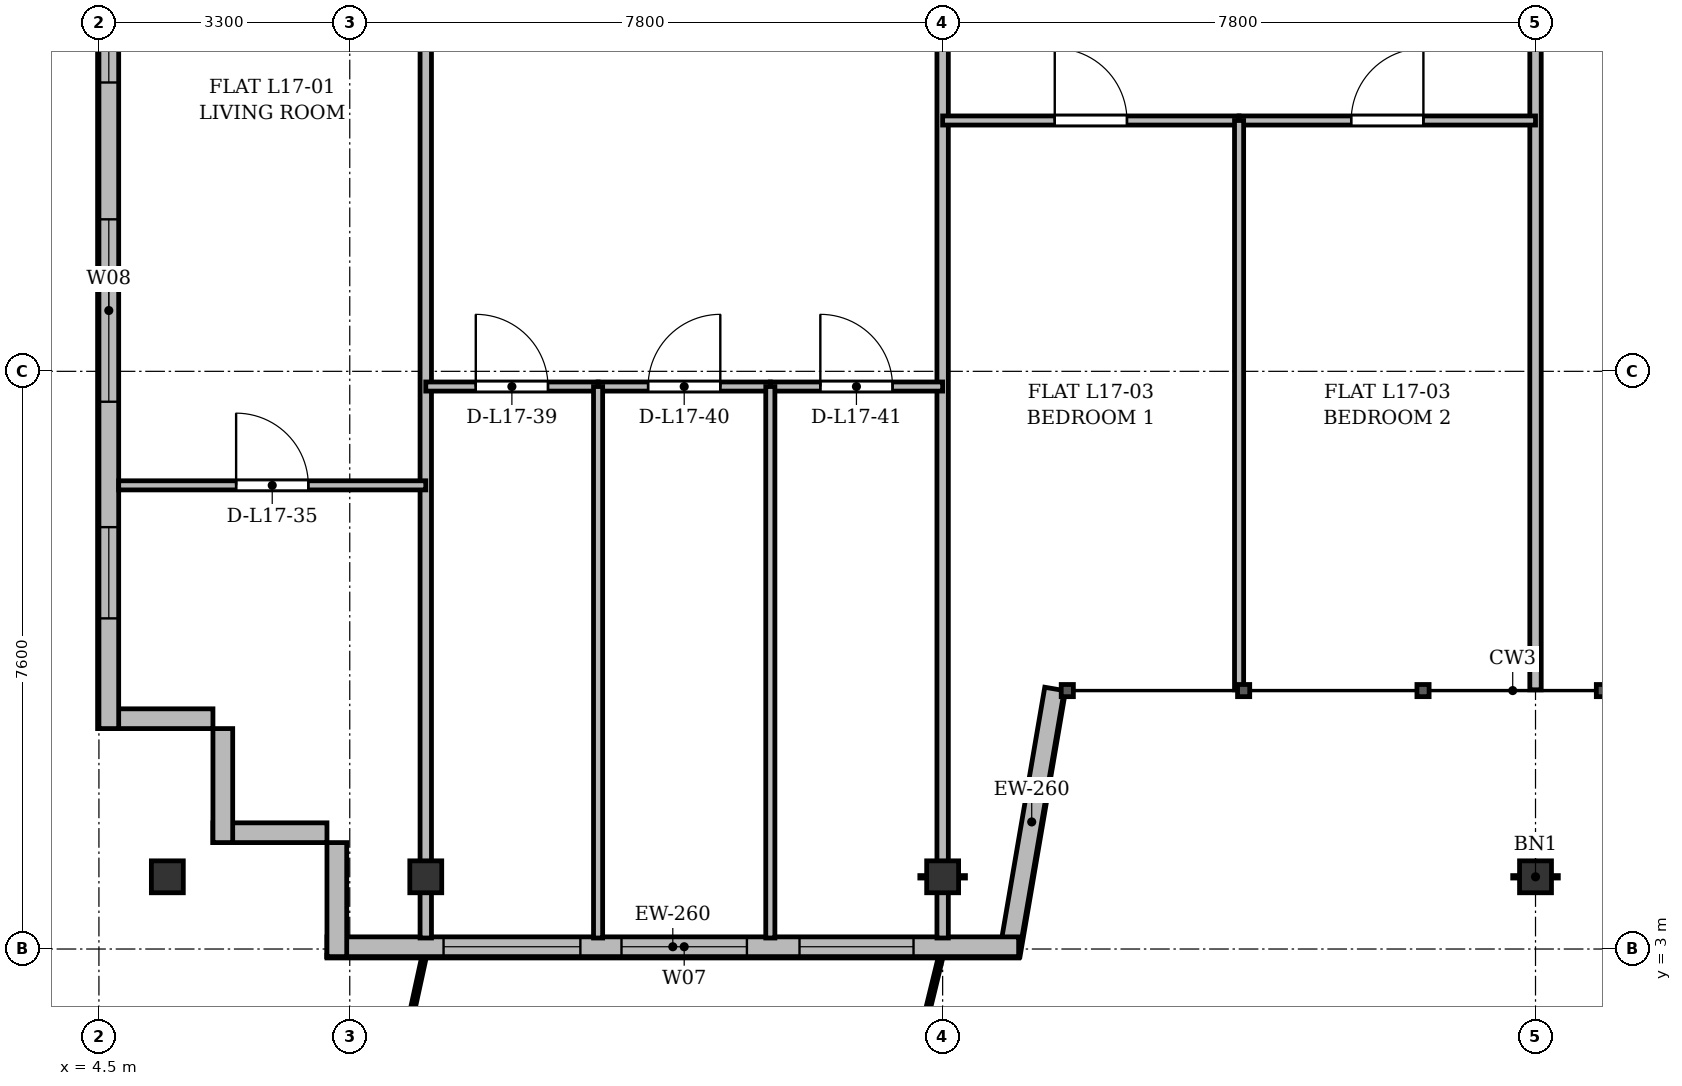
"""IFC4 building model, lengths in metres.
Left out: names, types, materials, properties, quantities, classifications, styles, units other than length and angle.
Written with IfcOpenShell. Run it as: python <this file> out.ifc"""

import sys

from ifc_helpers import new_model, si_unit, direction, frame, frame_2d, origin, origin_2d, place, context, subcontext, project, spatial, rectangle, i_section, extrude, source, transform, mapped, element, fill, save


model = new_model("IFC4")
c1 = context("Model", 3, precision=1e-05, world=origin(), true_north=direction((0.0, 1.0)))
c2 = subcontext(c1, "Body", "Model", "MODEL_VIEW")
j1 = project(units=[si_unit("LENGTHUNIT", "METRE"), si_unit("PLANEANGLEUNIT", "RADIAN")], contexts=[c1])
p1 = place(None, origin())
s1 = spatial("IfcSite", under=j1, at=p1, CompositionType="ELEMENT")
p2 = place(p1, origin())
s2 = spatial("IfcBuilding", under=s1, at=p2, CompositionType="ELEMENT")
p3 = place(p2, frame((0.0, 0.0, 66.7)))
s3 = spatial("IfcBuildingStorey", under=s2, at=p3, CompositionType="ELEMENT", Elevation=66.7)
m1 = source(origin(), c2, "Body", "SweptSolid", [
    extrude(i_section(OverallWidth=0.42, OverallDepth=0.42, WebThickness=0.026, FlangeThickness=0.04, at=origin_2d()), origin(), (0.0, 0.0, 1.0), 3.6),
])
for number, where, z_axis, x_axis in (
    (1, (5.4, 3.95, 0.0), (0.0, 0.0, 1.0), (1.0, 0.0, 0.0)),
    (2, (8.8, 3.95, 0.0), (0.0, 0.0, 1.0), (1.0, 0.0, 0.0)),
    (3, (15.6, 3.95, 0.0), (0.0, 0.0, 1.0), (1.0, 0.0, 0.0)),
    (4, (23.4, 3.95, 0.0), (0.0, 0.0, 1.0), (1.0, 0.0, 0.0)),
):
    element("IfcColumn", number, at=place(p3, frame(where, z_axis=z_axis, x_axis=x_axis)), inside=s3, PredefinedType="COLUMN", context=c2, shape_type="MappedRepresentation", body=[
        mapped(m1, transform((0.0, 0.0, 0.0), x_axis=(1.0, 0.0, 0.0), y_axis=(0.0, 1.0, 0.0), z_axis=(0.0, 0.0, 1.0), scale=1.0)),
    ])
for number, where, z_axis, x_axis in (
    (5, (7.5, 4.53, 0.0), (0.0, 0.0, 1.0), (-1.0, 0.0, 0.0)),
    (6, (6.13, 4.4, 0.0), (0.0, 0.0, 1.0), (0.0, 1.0, 0.0)),
):
    element("IfcWall", number, at=place(p3, frame(where, z_axis=z_axis, x_axis=x_axis)), inside=s3, PredefinedType="SOLIDWALL", context=c2, shape_type="SweptSolid", body=[
        extrude(rectangle(XDim=1.5, YDim=0.26, at=frame_2d((0.75, 0.0))), origin(), (0.0, 0.0, 1.0), 3.34),
    ])
p4 = place(p3, frame((6.0, 6.03, 0.0), z_axis=(0.0, 0.0, 1.0), x_axis=(-1.0, 0.0, 0.0)))
e7 = element("IfcWall", 7, at=p4, inside=s3, PredefinedType="SOLIDWALL", context=c2, shape_type="SweptSolid", body=[
    extrude(rectangle(XDim=1.5, YDim=0.26, at=frame_2d((0.75, 0.0))), origin(), (0.0, 0.0, 1.0), 2.752),
])
p5 = place(p3, frame((4.63, 5.9, 0.0), z_axis=(0.0, 0.0, 1.0), x_axis=(0.0, 1.0, 0.0)))
e8 = element("IfcWall", 8, at=p5, inside=s3, PredefinedType="SOLIDWALL", context=c2, shape_type="SweptSolid", body=[
    extrude(rectangle(XDim=39.6, YDim=0.26, at=frame_2d((19.8, 0.0))), origin(), (0.0, 0.0, 1.0), 3.34),
])
p6 = place(p5, frame((1.45, 0.0, 0.92)))
e9 = element("IfcOpeningElement", 9, at=p6, cuts=e8, PredefinedType="OPENING", context=c2, shape_type="SweptSolid", body=[
    extrude(rectangle(XDim=1.2, YDim=1.65, at=frame_2d((0.6, 0.825))), frame((0.0, 0.14, 0.0), z_axis=(0.0, -1.0, 0.0), x_axis=(1.0, 0.0, 0.0)), (0.0, 0.0, 1.0), 0.28),
])
p7 = place(p5, frame((4.3, 0.0, 0.92)))
e10 = element("IfcOpeningElement", 10, at=p7, cuts=e8, PredefinedType="OPENING", context=c2, shape_type="SweptSolid", body=[
    extrude(rectangle(XDim=2.4, YDim=2.1, at=frame_2d((1.2, 1.05))), frame((0.0, 0.14, 0.0), z_axis=(0.0, -1.0, 0.0), x_axis=(1.0, 0.0, 0.0)), (0.0, 0.0, 1.0), 0.28),
])
p8 = place(p5, frame((8.5, 0.0, 0.92)))
e11 = element("IfcOpeningElement", 11, at=p8, cuts=e8, PredefinedType="OPENING", context=c2, shape_type="SweptSolid", body=[
    extrude(rectangle(XDim=2.4, YDim=2.1, at=frame_2d((1.2, 1.05))), frame((0.0, 0.14, 0.0), z_axis=(0.0, -1.0, 0.0), x_axis=(1.0, 0.0, 0.0)), (0.0, 0.0, 1.0), 0.28),
])
p9 = place(p5, frame((33.9, 0.0, 0.92)))
e12 = element("IfcOpeningElement", 12, at=p9, cuts=e8, PredefinedType="OPENING", context=c2, shape_type="SweptSolid", body=[
    extrude(rectangle(XDim=1.2, YDim=1.65, at=frame_2d((0.6, 0.825))), frame((0.0, 0.14, 0.0), z_axis=(0.0, -1.0, 0.0), x_axis=(1.0, 0.0, 0.0)), (0.0, 0.0, 1.0), 0.28),
])
p10 = place(p5, frame((37.25, 0.0, 0.92)))
e13 = element("IfcOpeningElement", 13, at=p10, cuts=e8, PredefinedType="OPENING", context=c2, shape_type="SweptSolid", body=[
    extrude(rectangle(XDim=1.2, YDim=1.65, at=frame_2d((0.6, 0.825))), frame((0.0, 0.14, 0.0), z_axis=(0.0, -1.0, 0.0), x_axis=(1.0, 0.0, 0.0)), (0.0, 0.0, 1.0), 0.28),
])
p11 = place(p3, frame((17.072, 6.422, 0.0), z_axis=(0.0, 0.0, 1.0), x_axis=(-0.168990530437, -0.98561767467, 0.0)))
e14 = element("IfcWall", 14, at=p11, inside=s3, PredefinedType="SOLIDWALL", context=c2, shape_type="SweptSolid", body=[
    extrude(rectangle(XDim=3.551, YDim=0.26, at=frame_2d((1.775, 0.0))), origin(), (0.0, 0.0, 1.0), 2.69),
])
p12 = place(p3, frame((16.6, 3.03, 0.0), z_axis=(0.0, 0.0, 1.0), x_axis=(-1.0, 0.0, 0.0)))
e15 = element("IfcWall", 15, at=p12, inside=s3, PredefinedType="SOLIDWALL", context=c2, shape_type="SweptSolid", body=[
    extrude(rectangle(XDim=9.1, YDim=0.26, at=frame_2d((4.55, 0.0))), origin(), (0.0, 0.0, 1.0), 3.34),
])
p13 = place(p12, frame((1.383, 0.0, 0.9)))
e16 = element("IfcOpeningElement", 16, at=p13, cuts=e15, PredefinedType="OPENING", context=c2, shape_type="SweptSolid", body=[
    extrude(rectangle(XDim=1.5, YDim=1.75, at=frame_2d((0.75, 0.875))), frame((0.0, 0.14, 0.0), z_axis=(0.0, -1.0, 0.0), x_axis=(1.0, 0.0, 0.0)), (0.0, 0.0, 1.0), 0.28),
])
p14 = place(p12, frame((3.575, 0.0, 0.9)))
e17 = element("IfcOpeningElement", 17, at=p14, cuts=e15, PredefinedType="OPENING", context=c2, shape_type="SweptSolid", body=[
    extrude(rectangle(XDim=1.65, YDim=1.85, at=frame_2d((0.825, 0.925))), frame((0.0, 0.14, 0.0), z_axis=(0.0, -1.0, 0.0), x_axis=(1.0, 0.0, 0.0)), (0.0, 0.0, 1.0), 0.28),
])
p15 = place(p12, frame((5.766, 0.0, 0.9)))
e18 = element("IfcOpeningElement", 18, at=p15, cuts=e15, PredefinedType="OPENING", context=c2, shape_type="SweptSolid", body=[
    extrude(rectangle(XDim=1.8, YDim=1.8, at=frame_2d((0.9, 0.9))), frame((0.0, 0.14, 0.0), z_axis=(0.0, -1.0, 0.0), x_axis=(1.0, 0.0, 0.0)), (0.0, 0.0, 1.0), 0.28),
])
p16 = place(p3, frame((7.63, 2.9, 0.0), z_axis=(0.0, 0.0, 1.0), x_axis=(0.0, 1.0, 0.0)))
e19 = element("IfcWall", 19, at=p16, inside=s3, PredefinedType="SOLIDWALL", context=c2, shape_type="SweptSolid", body=[
    extrude(rectangle(XDim=1.5, YDim=0.26, at=frame_2d((0.75, 0.0))), origin(), (0.0, 0.0, 1.0), 2.69),
])
for number, where, z_axis, x_axis in (
    (20, (8.8, 3.145, 0.0), (0.0, 0.0, 1.0), (0.0, 1.0, 0.0)),
    (21, (15.6, 3.145, 0.0), (0.0, 0.0, 1.0), (0.0, 1.0, 0.0)),
):
    element("IfcWall", number, at=place(p3, frame(where, z_axis=z_axis, x_axis=x_axis)), inside=s3, PredefinedType="PARTITIONING", context=c2, shape_type="SweptSolid", body=[
        extrude(rectangle(XDim=24.455, YDim=0.15, at=frame_2d((12.228, 0.0))), origin(), (0.0, 0.0, 1.0), 2.752),
    ])
p17 = place(p3, frame((23.4, 6.41, 0.0), z_axis=(0.0, 0.0, 1.0), x_axis=(0.0, 1.0, 0.0)))
e22 = element("IfcWall", 22, at=p17, inside=s3, PredefinedType="PARTITIONING", context=c2, shape_type="SweptSolid", body=[
    extrude(rectangle(XDim=21.19, YDim=0.15, at=frame_2d((10.595, 0.0))), origin(), (0.0, 0.0, 1.0), 2.752),
])
p18 = place(p3, frame((4.76, 9.1, 0.0), z_axis=(0.0, 0.0, 1.0), x_axis=(1.0, 0.0, 0.0)))
e23 = element("IfcWall", 23, at=p18, inside=s3, PredefinedType="PARTITIONING", context=c2, shape_type="SweptSolid", body=[
    extrude(rectangle(XDim=4.04, YDim=0.12, at=frame_2d((2.02, 0.0))), origin(), (0.0, 0.0, 1.0), 2.752),
])
p19 = place(p18, frame((1.545, 0.0, 0.0)))
e24 = element("IfcOpeningElement", 24, at=p19, cuts=e23, PredefinedType="OPENING", context=c2, shape_type="SweptSolid", body=[
    extrude(rectangle(XDim=0.95, YDim=2.15, at=frame_2d((0.475, 1.075))), frame((0.0, 0.07, 0.0), z_axis=(0.0, -1.0, 0.0), x_axis=(1.0, 0.0, 0.0)), (0.0, 0.0, 1.0), 0.14),
])
p20 = place(p3, frame((8.8, 10.4, 0.0), z_axis=(0.0, 0.0, 1.0), x_axis=(1.0, 0.0, 0.0)))
e25 = element("IfcWall", 25, at=p20, inside=s3, PredefinedType="PARTITIONING", context=c2, shape_type="SweptSolid", body=[
    extrude(rectangle(XDim=2.267, YDim=0.12, at=frame_2d((1.133, 0.0))), origin(), (0.0, 0.0, 1.0), 2.752),
])
p21 = place(p20, frame((0.658, 0.0, 0.0)))
e26 = element("IfcOpeningElement", 26, at=p21, cuts=e25, PredefinedType="OPENING", context=c2, shape_type="SweptSolid", body=[
    extrude(rectangle(XDim=0.95, YDim=2.15, at=frame_2d((0.475, 1.075))), frame((0.0, 0.07, 0.0), z_axis=(0.0, -1.0, 0.0), x_axis=(1.0, 0.0, 0.0)), (0.0, 0.0, 1.0), 0.14),
])
p22 = place(p3, frame((11.067, 10.4, 0.0), z_axis=(0.0, 0.0, 1.0), x_axis=(1.0, 0.0, 0.0)))
e27 = element("IfcWall", 27, at=p22, inside=s3, PredefinedType="PARTITIONING", context=c2, shape_type="SweptSolid", body=[
    extrude(rectangle(XDim=2.266, YDim=0.12, at=frame_2d((1.133, 0.0))), origin(), (0.0, 0.0, 1.0), 3.34),
])
p23 = place(p22, frame((0.658, 0.0, 0.0)))
e28 = element("IfcOpeningElement", 28, at=p23, cuts=e27, PredefinedType="OPENING", context=c2, shape_type="SweptSolid", body=[
    extrude(rectangle(XDim=0.95, YDim=2.15, at=frame_2d((0.475, 1.075))), frame((0.0, 0.07, 0.0), z_axis=(0.0, -1.0, 0.0), x_axis=(1.0, 0.0, 0.0)), (0.0, 0.0, 1.0), 0.14),
])
p24 = place(p3, frame((11.067, 3.145, 0.0), z_axis=(0.0, 0.0, 1.0), x_axis=(0.0, 1.0, 0.0)))
e29 = element("IfcWall", 29, at=p24, inside=s3, PredefinedType="PARTITIONING", context=c2, shape_type="SweptSolid", body=[
    extrude(rectangle(XDim=7.255, YDim=0.12, at=frame_2d((3.627, 0.0))), origin(), (0.0, 0.0, 1.0), 2.69),
])
p25 = place(p3, frame((13.333, 10.4, 0.0), z_axis=(0.0, 0.0, 1.0), x_axis=(1.0, 0.0, 0.0)))
e30 = element("IfcWall", 30, at=p25, inside=s3, PredefinedType="PARTITIONING", context=c2, shape_type="SweptSolid", body=[
    extrude(rectangle(XDim=2.267, YDim=0.12, at=frame_2d((1.134, 0.0))), origin(), (0.0, 0.0, 1.0), 2.752),
])
p26 = place(p25, frame((0.658, 0.0, 0.0)))
e31 = element("IfcOpeningElement", 31, at=p26, cuts=e30, PredefinedType="OPENING", context=c2, shape_type="SweptSolid", body=[
    extrude(rectangle(XDim=0.95, YDim=2.15, at=frame_2d((0.475, 1.075))), frame((0.0, 0.07, 0.0), z_axis=(0.0, -1.0, 0.0), x_axis=(1.0, 0.0, 0.0)), (0.0, 0.0, 1.0), 0.14),
])
p27 = place(p3, frame((13.333, 3.145, 0.0), z_axis=(0.0, 0.0, 1.0), x_axis=(0.0, 1.0, 0.0)))
e32 = element("IfcWall", 32, at=p27, inside=s3, PredefinedType="PARTITIONING", context=c2, shape_type="SweptSolid", body=[
    extrude(rectangle(XDim=7.255, YDim=0.12, at=frame_2d((3.627, 0.0))), origin(), (0.0, 0.0, 1.0), 2.69),
])
p28 = place(p3, frame((15.6, 13.9, 0.0), z_axis=(0.0, 0.0, 1.0), x_axis=(1.0, 0.0, 0.0)))
e33 = element("IfcWall", 33, at=p28, inside=s3, PredefinedType="PARTITIONING", context=c2, shape_type="SweptSolid", body=[
    extrude(rectangle(XDim=3.9, YDim=0.12, at=frame_2d((1.95, 0.0))), origin(), (0.0, 0.0, 1.0), 2.752),
])
p29 = place(p28, frame((1.475, 0.0, 0.0)))
e34 = element("IfcOpeningElement", 34, at=p29, cuts=e33, PredefinedType="OPENING", context=c2, shape_type="SweptSolid", body=[
    extrude(rectangle(XDim=0.95, YDim=2.15, at=frame_2d((0.475, 1.075))), frame((0.0, 0.07, 0.0), z_axis=(0.0, -1.0, 0.0), x_axis=(1.0, 0.0, 0.0)), (0.0, 0.0, 1.0), 0.14),
])
p30 = place(p3, frame((19.5, 13.9, 0.0), z_axis=(0.0, 0.0, 1.0), x_axis=(1.0, 0.0, 0.0)))
e35 = element("IfcWall", 35, at=p30, inside=s3, PredefinedType="PARTITIONING", context=c2, shape_type="SweptSolid", body=[
    extrude(rectangle(XDim=3.9, YDim=0.12, at=frame_2d((1.95, 0.0))), origin(), (0.0, 0.0, 1.0), 2.752),
])
p31 = place(p30, frame((1.475, 0.0, 0.0)))
e36 = element("IfcOpeningElement", 36, at=p31, cuts=e35, PredefinedType="OPENING", context=c2, shape_type="SweptSolid", body=[
    extrude(rectangle(XDim=0.95, YDim=2.15, at=frame_2d((0.475, 1.075))), frame((0.0, 0.07, 0.0), z_axis=(0.0, -1.0, 0.0), x_axis=(1.0, 0.0, 0.0)), (0.0, 0.0, 1.0), 0.14),
])
p32 = place(p3, frame((19.5, 6.41, 0.0), z_axis=(0.0, 0.0, 1.0), x_axis=(0.0, 1.0, 0.0)))
e37 = element("IfcWall", 37, at=p32, inside=s3, PredefinedType="PARTITIONING", context=c2, shape_type="SweptSolid", body=[
    extrude(rectangle(XDim=7.49, YDim=0.12, at=frame_2d((3.745, 0.0))), origin(), (0.0, 0.0, 1.0), 3.34),
])
m2 = source(origin(), c2, "Body", "SweptSolid", [
    extrude(rectangle(XDim=1.2, YDim=1.65, at=frame_2d((0.6, 0.825))), frame((0.0, 0.03, 0.0), z_axis=(0.0, -1.0, 0.0), x_axis=(1.0, 0.0, 0.0)), (0.0, 0.0, 1.0), 0.06),
])
p33 = place(p6, origin())
e38 = element("IfcWindow", 38, at=p33, inside=s3, PartitioningType="SINGLE_PANEL", PredefinedType="WINDOW", context=c2, shape_type="MappedRepresentation", body=[
    mapped(m2, transform((0.0, 0.0, 0.0), x_axis=(1.0, 0.0, 0.0), y_axis=(0.0, 1.0, 0.0), z_axis=(0.0, 0.0, 1.0), scale=1.0)),
])
fill(e9, e38)
m3 = source(origin(), c2, "Body", "SweptSolid", [
    extrude(rectangle(XDim=2.4, YDim=2.1, at=frame_2d((1.2, 1.05))), frame((0.0, 0.03, 0.0), z_axis=(0.0, -1.0, 0.0), x_axis=(1.0, 0.0, 0.0)), (0.0, 0.0, 1.0), 0.06),
])
p34 = place(p7, origin())
e39 = element("IfcWindow", 39, at=p34, inside=s3, PartitioningType="SINGLE_PANEL", PredefinedType="WINDOW", context=c2, shape_type="MappedRepresentation", body=[
    mapped(m3, transform((0.0, 0.0, 0.0), x_axis=(1.0, 0.0, 0.0), y_axis=(0.0, 1.0, 0.0), z_axis=(0.0, 0.0, 1.0), scale=1.0)),
])
fill(e10, e39)
p35 = place(p8, origin())
e40 = element("IfcWindow", 40, at=p35, inside=s3, PartitioningType="SINGLE_PANEL", PredefinedType="WINDOW", context=c2, shape_type="MappedRepresentation", body=[
    mapped(m3, transform((0.0, 0.0, 0.0), x_axis=(1.0, 0.0, 0.0), y_axis=(0.0, 1.0, 0.0), z_axis=(0.0, 0.0, 1.0), scale=1.0)),
])
fill(e11, e40)
m4 = source(origin(), c2, "Body", "SweptSolid", [
    extrude(rectangle(XDim=1.5, YDim=1.75, at=frame_2d((0.75, 0.875))), frame((0.0, 0.03, 0.0), z_axis=(0.0, -1.0, 0.0), x_axis=(1.0, 0.0, 0.0)), (0.0, 0.0, 1.0), 0.06),
])
p36 = place(p13, origin())
e41 = element("IfcWindow", 41, at=p36, inside=s3, PartitioningType="SINGLE_PANEL", PredefinedType="WINDOW", context=c2, shape_type="MappedRepresentation", body=[
    mapped(m4, transform((0.0, 0.0, 0.0), x_axis=(1.0, 0.0, 0.0), y_axis=(0.0, 1.0, 0.0), z_axis=(0.0, 0.0, 1.0), scale=1.0)),
])
fill(e16, e41)
m5 = source(origin(), c2, "Body", "SweptSolid", [
    extrude(rectangle(XDim=1.65, YDim=1.85, at=frame_2d((0.825, 0.925))), frame((0.0, 0.03, 0.0), z_axis=(0.0, -1.0, 0.0), x_axis=(1.0, 0.0, 0.0)), (0.0, 0.0, 1.0), 0.06),
])
p37 = place(p14, origin())
e42 = element("IfcWindow", 42, at=p37, inside=s3, PartitioningType="SINGLE_PANEL", PredefinedType="WINDOW", context=c2, shape_type="MappedRepresentation", body=[
    mapped(m5, transform((0.0, 0.0, 0.0), x_axis=(1.0, 0.0, 0.0), y_axis=(0.0, 1.0, 0.0), z_axis=(0.0, 0.0, 1.0), scale=1.0)),
])
fill(e17, e42)
m6 = source(origin(), c2, "Body", "SweptSolid", [
    extrude(rectangle(XDim=1.8, YDim=1.8, at=frame_2d((0.9, 0.9))), frame((0.0, 0.03, 0.0), z_axis=(0.0, -1.0, 0.0), x_axis=(1.0, 0.0, 0.0)), (0.0, 0.0, 1.0), 0.06),
])
p38 = place(p15, origin())
e43 = element("IfcWindow", 43, at=p38, inside=s3, PartitioningType="SINGLE_PANEL", PredefinedType="WINDOW", context=c2, shape_type="MappedRepresentation", body=[
    mapped(m6, transform((0.0, 0.0, 0.0), x_axis=(1.0, 0.0, 0.0), y_axis=(0.0, 1.0, 0.0), z_axis=(0.0, 0.0, 1.0), scale=1.0)),
])
fill(e18, e43)
m7 = source(origin(), c2, "Body", "SweptSolid", [
    extrude(rectangle(XDim=0.95, YDim=2.15, at=frame_2d((0.475, 1.075))), frame((0.0, 0.025, 0.0), z_axis=(0.0, -1.0, 0.0), x_axis=(1.0, 0.0, 0.0)), (0.0, 0.0, 1.0), 0.05),
])
p39 = place(p19, origin())
e44 = element("IfcDoor", 44, at=p39, inside=s3, OperationType="SINGLE_SWING_LEFT", PredefinedType="DOOR", context=c2, shape_type="MappedRepresentation", body=[
    mapped(m7, transform((0.0, 0.0, 0.0), x_axis=(1.0, 0.0, 0.0), y_axis=(0.0, 1.0, 0.0), z_axis=(0.0, 0.0, 1.0), scale=1.0)),
])
fill(e24, e44)
p40 = place(p21, origin())
e45 = element("IfcDoor", 45, at=p40, inside=s3, OperationType="SINGLE_SWING_LEFT", PredefinedType="DOOR", context=c2, shape_type="MappedRepresentation", body=[
    mapped(m7, transform((0.0, 0.0, 0.0), x_axis=(1.0, 0.0, 0.0), y_axis=(0.0, 1.0, 0.0), z_axis=(0.0, 0.0, 1.0), scale=1.0)),
])
fill(e26, e45)
p41 = place(p23, origin())
e46 = element("IfcDoor", 46, at=p41, inside=s3, OperationType="SINGLE_SWING_RIGHT", PredefinedType="DOOR", context=c2, shape_type="MappedRepresentation", body=[
    mapped(m7, transform((0.0, 0.0, 0.0), x_axis=(1.0, 0.0, 0.0), y_axis=(0.0, 1.0, 0.0), z_axis=(0.0, 0.0, 1.0), scale=1.0)),
])
fill(e28, e46)
p42 = place(p26, origin())
e47 = element("IfcDoor", 47, at=p42, inside=s3, OperationType="SINGLE_SWING_LEFT", PredefinedType="DOOR", context=c2, shape_type="MappedRepresentation", body=[
    mapped(m7, transform((0.0, 0.0, 0.0), x_axis=(1.0, 0.0, 0.0), y_axis=(0.0, 1.0, 0.0), z_axis=(0.0, 0.0, 1.0), scale=1.0)),
])
fill(e31, e47)
p43 = place(p29, origin())
e48 = element("IfcDoor", 48, at=p43, inside=s3, OperationType="SINGLE_SWING_LEFT", PredefinedType="DOOR", context=c2, shape_type="MappedRepresentation", body=[
    mapped(m7, transform((0.0, 0.0, 0.0), x_axis=(1.0, 0.0, 0.0), y_axis=(0.0, 1.0, 0.0), z_axis=(0.0, 0.0, 1.0), scale=1.0)),
])
fill(e34, e48)
p44 = place(p31, origin())
e49 = element("IfcDoor", 49, at=p44, inside=s3, OperationType="SINGLE_SWING_RIGHT", PredefinedType="DOOR", context=c2, shape_type="MappedRepresentation", body=[
    mapped(m7, transform((0.0, 0.0, 0.0), x_axis=(1.0, 0.0, 0.0), y_axis=(0.0, 1.0, 0.0), z_axis=(0.0, 0.0, 1.0), scale=1.0)),
])
fill(e36, e49)
save(model, sys.argv[1])
